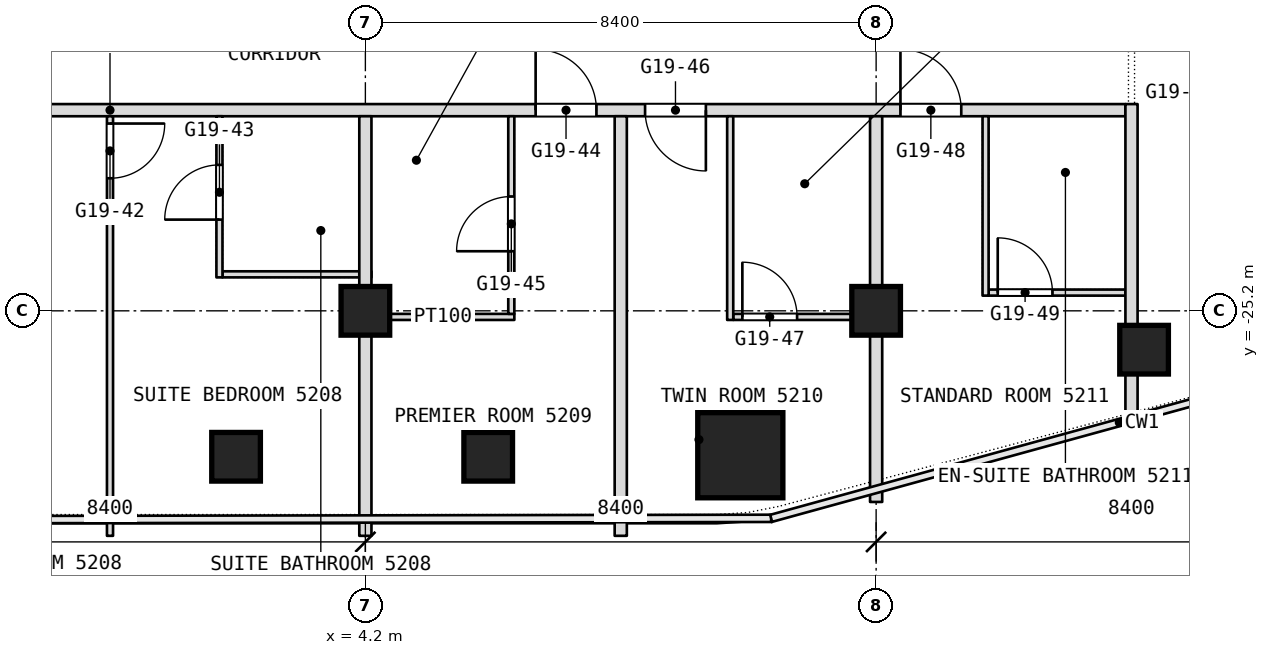
"""IFC4 building model, lengths in metres.
Left out: names, types, materials, properties, quantities, classifications, styles, units other than length and angle.
Written with IfcOpenShell. Run it as: python <this file> out.ifc"""

import sys

from ifc_helpers import new_model, si_unit, direction, frame, frame_2d, origin, origin_2d, place, context, subcontext, project, spatial, rectangle, extrude, element, fill, save


model = new_model("IFC4")
c1 = context("Model", 3, precision=1e-05, world=origin(), true_north=direction((0.0, 1.0)))
c2 = subcontext(c1, "Body", "Model", "MODEL_VIEW")
j1 = project(units=[si_unit("LENGTHUNIT", "METRE"), si_unit("PLANEANGLEUNIT", "RADIAN")], contexts=[c1])
p1 = place(None, origin())
s1 = spatial("IfcSite", under=j1, at=p1, CompositionType="ELEMENT")
p2 = place(p1, origin())
s2 = spatial("IfcBuilding", under=s1, at=p2, CompositionType="ELEMENT")
p3 = place(p2, frame((0.0, 0.0, 223.7)))
s3 = spatial("IfcBuildingStorey", under=s2, at=p3, CompositionType="ELEMENT", Elevation=223.7)
p4 = place(p3, frame((10.366, -27.575, 0.0), z_axis=(0.0, 0.0, 1.0), x_axis=(1.0, 0.0, 0.0)))
e1 = element("IfcColumn", 1, at=p4, inside=s3, PredefinedType="COLUMN", context=c2, shape_type="SweptSolid", body=[
    extrude(rectangle(XDim=1.4, YDim=1.4, at=origin_2d()), origin(), (0.0, 0.0, 1.0), 3.6),
])
for number, where, z_axis, x_axis in (
    (2, (4.2, -25.2, 0.0), (0.0, 0.0, 1.0), (1.0, 0.0, 0.0)),
    (3, (12.6, -25.2, 0.0), (0.0, 0.0, 1.0), (1.0, 0.0, 0.0)),
    (4, (17.007, -25.839, 0.0), (0.0, 0.0, 1.0), (1.0, 0.0, 0.0)),
    (5, (6.22, -27.6, 0.0), (0.0, 0.0, 1.0), (1.0, 0.0, 0.0)),
    (6, (2.073, -27.6, 0.0), (0.0, 0.0, 1.0), (1.0, 0.0, 0.0)),
):
    element("IfcColumn", number, at=place(p3, frame(where, z_axis=z_axis, x_axis=x_axis)), inside=s3, PredefinedType="COLUMN", context=c2, shape_type="SweptSolid", body=[
        extrude(rectangle(XDim=0.8, YDim=0.8, at=origin_2d()), origin(), (0.0, 0.0, 1.0), 3.6),
    ])
p5 = place(p3, frame((4.3, -25.3, 0.0), z_axis=(0.0, 0.0, 1.0), x_axis=(1.0, 0.0, 0.0)))
e7 = element("IfcWall", 7, at=p5, inside=s3, PredefinedType="PARTITIONING", context=c2, shape_type="SweptSolid", body=[
    extrude(rectangle(XDim=2.35, YDim=0.1, at=frame_2d((1.175, 0.0))), origin(), (0.0, 0.0, 1.0), 2.94),
])
p6 = place(p3, frame((10.25, -25.3, 0.0), z_axis=(0.0, 0.0, 1.0), x_axis=(1.0, 0.0, 0.0)))
e8 = element("IfcWall", 8, at=p6, inside=s3, PredefinedType="PARTITIONING", context=c2, shape_type="SweptSolid", body=[
    extrude(rectangle(XDim=2.45, YDim=0.1, at=frame_2d((1.225, 0.0))), origin(), (0.0, 0.0, 1.0), 2.94),
])
p7 = place(p6, frame((0.15, 0.0, 0.0)))
e9 = element("IfcOpeningElement", 9, at=p7, cuts=e8, PredefinedType="OPENING", context=c2, shape_type="SweptSolid", body=[
    extrude(rectangle(XDim=0.9, YDim=2.1, at=frame_2d((0.45, 1.05))), frame((0.0, 0.05, 0.0), z_axis=(0.0, -1.0, 0.0), x_axis=(1.0, 0.0, 0.0)), (0.0, 0.0, 1.0), 0.1),
])
p8 = place(p3, frame((14.45, -24.9, 0.0), z_axis=(0.0, 0.0, 1.0), x_axis=(1.0, 0.0, 0.0)))
e10 = element("IfcWall", 10, at=p8, inside=s3, PredefinedType="PARTITIONING", context=c2, shape_type="SweptSolid", body=[
    extrude(rectangle(XDim=2.25, YDim=0.1, at=frame_2d((1.125, 0.0))), origin(), (0.0, 0.0, 1.0), 3.34),
])
p9 = place(p8, frame((0.15, 0.0, 0.0)))
e11 = element("IfcOpeningElement", 11, at=p9, cuts=e10, PredefinedType="OPENING", context=c2, shape_type="SweptSolid", body=[
    extrude(rectangle(XDim=0.9, YDim=2.1, at=frame_2d((0.45, 1.05))), frame((0.0, 0.05, 0.0), z_axis=(0.0, -1.0, 0.0), x_axis=(1.0, 0.0, 0.0)), (0.0, 0.0, 1.0), 0.1),
])
p10 = place(p3, frame((1.85, -24.6, 0.0), z_axis=(0.0, 0.0, 1.0), x_axis=(1.0, 0.0, 0.0)))
e12 = element("IfcWall", 12, at=p10, inside=s3, PredefinedType="PARTITIONING", context=c2, shape_type="SweptSolid", body=[
    extrude(rectangle(XDim=2.45, YDim=0.1, at=frame_2d((1.225, 0.0))), origin(), (0.0, 0.0, 1.0), 3.34),
])
p11 = place(p3, frame((-16.7, -21.9, 0.0), z_axis=(0.0, 0.0, 1.0), x_axis=(1.0, 0.0, 0.0)))
e13 = element("IfcWall", 13, at=p11, inside=s3, PredefinedType="PARTITIONING", context=c2, shape_type="SweptSolid", body=[
    extrude(rectangle(XDim=33.4, YDim=0.2, at=frame_2d((16.7, 0.0))), origin(), (0.0, 0.0, 1.0), 3.34),
])
p12 = place(p11, frame((0.3, 0.0, 0.0)))
e14 = element("IfcOpeningElement", 14, at=p12, cuts=e13, PredefinedType="OPENING", context=c2, shape_type="SweptSolid", body=[
    extrude(rectangle(XDim=1.0, YDim=2.1, at=frame_2d((0.5, 1.05))), frame((0.0, 0.1, 0.0), z_axis=(0.0, -1.0, 0.0), x_axis=(1.0, 0.0, 0.0)), (0.0, 0.0, 1.0), 0.2),
])
p13 = place(p11, frame((7.8, 0.0, 0.0)))
e15 = element("IfcOpeningElement", 15, at=p13, cuts=e13, PredefinedType="OPENING", context=c2, shape_type="SweptSolid", body=[
    extrude(rectangle(XDim=1.1, YDim=2.1, at=frame_2d((0.55, 1.05))), frame((0.0, 0.1, 0.0), z_axis=(0.0, -1.0, 0.0), x_axis=(1.0, 0.0, 0.0)), (0.0, 0.0, 1.0), 0.2),
])
p14 = place(p11, frame((14.05, 0.0, 0.0)))
e16 = element("IfcOpeningElement", 16, at=p14, cuts=e13, PredefinedType="OPENING", context=c2, shape_type="SweptSolid", body=[
    extrude(rectangle(XDim=1.1, YDim=2.1, at=frame_2d((0.55, 1.05))), frame((0.0, 0.1, 0.0), z_axis=(0.0, -1.0, 0.0), x_axis=(1.0, 0.0, 0.0)), (0.0, 0.0, 1.0), 0.2),
])
p15 = place(p11, frame((23.7, 0.0, 0.0)))
e17 = element("IfcOpeningElement", 17, at=p15, cuts=e13, PredefinedType="OPENING", context=c2, shape_type="SweptSolid", body=[
    extrude(rectangle(XDim=1.0, YDim=2.1, at=frame_2d((0.5, 1.05))), frame((0.0, 0.1, 0.0), z_axis=(0.0, -1.0, 0.0), x_axis=(1.0, 0.0, 0.0)), (0.0, 0.0, 1.0), 0.2),
])
p16 = place(p11, frame((25.5, 0.0, 0.0)))
e18 = element("IfcOpeningElement", 18, at=p16, cuts=e13, PredefinedType="OPENING", context=c2, shape_type="SweptSolid", body=[
    extrude(rectangle(XDim=1.0, YDim=2.1, at=frame_2d((0.5, 1.05))), frame((0.0, 0.1, 0.0), z_axis=(0.0, -1.0, 0.0), x_axis=(1.0, 0.0, 0.0)), (0.0, 0.0, 1.0), 0.2),
])
p17 = place(p11, frame((29.7, 0.0, 0.0)))
e19 = element("IfcOpeningElement", 19, at=p17, cuts=e13, PredefinedType="OPENING", context=c2, shape_type="SweptSolid", body=[
    extrude(rectangle(XDim=1.0, YDim=2.1, at=frame_2d((0.5, 1.05))), frame((0.0, 0.1, 0.0), z_axis=(0.0, -1.0, 0.0), x_axis=(1.0, 0.0, 0.0)), (0.0, 0.0, 1.0), 0.2),
])
p18 = place(p3, frame((16.8, -27.229, 0.0), z_axis=(0.0, 0.0, 1.0), x_axis=(0.0, 1.0, 0.0)))
e20 = element("IfcWall", 20, at=p18, inside=s3, PredefinedType="PARTITIONING", context=c2, shape_type="SweptSolid", body=[
    extrude(rectangle(XDim=5.429, YDim=0.2, at=frame_2d((2.714, 0.0))), origin(), (0.0, 0.0, 1.0), 3.34),
])
p19 = place(p3, frame((14.4, -24.95, 0.0), z_axis=(0.0, 0.0, 1.0), x_axis=(0.0, 1.0, 0.0)))
e21 = element("IfcWall", 21, at=p19, inside=s3, PredefinedType="PARTITIONING", context=c2, shape_type="SweptSolid", body=[
    extrude(rectangle(XDim=2.95, YDim=0.1, at=frame_2d((1.475, 0.0))), origin(), (0.0, 0.0, 1.0), 3.34),
])
p20 = place(p3, frame((12.6, -28.343, 0.0), z_axis=(0.0, 0.0, 1.0), x_axis=(0.0, 1.0, 0.0)))
e22 = element("IfcWall", 22, at=p20, inside=s3, PredefinedType="PARTITIONING", context=c2, shape_type="SweptSolid", body=[
    extrude(rectangle(XDim=6.343, YDim=0.2, at=frame_2d((3.171, 0.0))), origin(), (0.0, 0.0, 1.0), 3.34),
])
p21 = place(p3, frame((10.2, -25.35, 0.0), z_axis=(0.0, 0.0, 1.0), x_axis=(0.0, 1.0, 0.0)))
e23 = element("IfcWall", 23, at=p21, inside=s3, PredefinedType="PARTITIONING", context=c2, shape_type="SweptSolid", body=[
    extrude(rectangle(XDim=3.35, YDim=0.1, at=frame_2d((1.675, 0.0))), origin(), (0.0, 0.0, 1.0), 3.34),
])
p22 = place(p3, frame((8.4, -28.9, 0.0), z_axis=(0.0, 0.0, 1.0), x_axis=(0.0, 1.0, 0.0)))
e24 = element("IfcWall", 24, at=p22, inside=s3, PredefinedType="PARTITIONING", context=c2, shape_type="SweptSolid", body=[
    extrude(rectangle(XDim=6.9, YDim=0.2, at=frame_2d((3.45, 0.0))), origin(), (0.0, 0.0, 1.0), 3.34),
])
p23 = place(p3, frame((6.6, -25.25, 0.0), z_axis=(0.0, 0.0, 1.0), x_axis=(0.0, 1.0, 0.0)))
e25 = element("IfcWall", 25, at=p23, inside=s3, PredefinedType="PARTITIONING", context=c2, shape_type="SweptSolid", body=[
    extrude(rectangle(XDim=3.25, YDim=0.1, at=frame_2d((1.625, 0.0))), origin(), (0.0, 0.0, 1.0), 3.34),
])
p24 = place(p23, frame((1.03, 0.0, 0.0)))
e26 = element("IfcOpeningElement", 26, at=p24, cuts=e25, PredefinedType="OPENING", context=c2, shape_type="SweptSolid", body=[
    extrude(rectangle(XDim=0.9, YDim=2.1, at=frame_2d((0.45, 1.05))), frame((0.0, 0.05, 0.0), z_axis=(0.0, -1.0, 0.0), x_axis=(1.0, 0.0, 0.0)), (0.0, 0.0, 1.0), 0.1),
])
p25 = place(p3, frame((4.2, -28.9, 0.0), z_axis=(0.0, 0.0, 1.0), x_axis=(0.0, 1.0, 0.0)))
e27 = element("IfcWall", 27, at=p25, inside=s3, PredefinedType="PARTITIONING", context=c2, shape_type="SweptSolid", body=[
    extrude(rectangle(XDim=6.9, YDim=0.2, at=frame_2d((3.45, 0.0))), origin(), (0.0, 0.0, 1.0), 3.34),
])
p26 = place(p3, frame((1.8, -24.65, 0.0), z_axis=(0.0, 0.0, 1.0), x_axis=(0.0, 1.0, 0.0)))
e28 = element("IfcWall", 28, at=p26, inside=s3, PredefinedType="PARTITIONING", context=c2, shape_type="SweptSolid", body=[
    extrude(rectangle(XDim=2.65, YDim=0.1, at=frame_2d((1.325, 0.0))), origin(), (0.0, 0.0, 1.0), 3.34),
])
p27 = place(p26, frame((0.95, 0.0, 0.0)))
e29 = element("IfcOpeningElement", 29, at=p27, cuts=e28, PredefinedType="OPENING", context=c2, shape_type="SweptSolid", body=[
    extrude(rectangle(XDim=0.9, YDim=2.1, at=frame_2d((0.45, 1.05))), frame((0.0, 0.05, 0.0), z_axis=(0.0, -1.0, 0.0), x_axis=(1.0, 0.0, 0.0)), (0.0, 0.0, 1.0), 0.1),
])
p28 = place(p3, frame((0.0, -28.9, 0.0), z_axis=(0.0, 0.0, 1.0), x_axis=(0.0, 1.0, 0.0)))
e30 = element("IfcWall", 30, at=p28, inside=s3, PredefinedType="PARTITIONING", context=c2, shape_type="SweptSolid", body=[
    extrude(rectangle(XDim=6.9, YDim=0.1, at=frame_2d((3.45, 0.0))), origin(), (0.0, 0.0, 1.0), 3.34),
])
p29 = place(p28, frame((5.88, 0.0, 0.0)))
e31 = element("IfcOpeningElement", 31, at=p29, cuts=e30, PredefinedType="OPENING", context=c2, shape_type="SweptSolid", body=[
    extrude(rectangle(XDim=0.9, YDim=2.1, at=frame_2d((0.45, 1.05))), frame((0.0, 0.05, 0.0), z_axis=(0.0, -1.0, 0.0), x_axis=(1.0, 0.0, 0.0)), (0.0, 0.0, 1.0), 0.1),
])
p30 = place(p7, origin())
e32 = element("IfcDoor", 32, at=p30, inside=s3, OperationType="SINGLE_SWING_LEFT", PredefinedType="DOOR", context=c2, shape_type="SweptSolid", body=[
    extrude(rectangle(XDim=0.9, YDim=2.1, at=frame_2d((0.45, 1.05))), frame((0.0, 0.025, 0.0), z_axis=(0.0, -1.0, 0.0), x_axis=(1.0, 0.0, 0.0)), (0.0, 0.0, 1.0), 0.05),
])
fill(e9, e32)
p31 = place(p9, origin())
e33 = element("IfcDoor", 33, at=p31, inside=s3, OperationType="SINGLE_SWING_LEFT", PredefinedType="DOOR", context=c2, shape_type="SweptSolid", body=[
    extrude(rectangle(XDim=0.9, YDim=2.1, at=frame_2d((0.45, 1.05))), frame((0.0, 0.025, 0.0), z_axis=(0.0, -1.0, 0.0), x_axis=(1.0, 0.0, 0.0)), (0.0, 0.0, 1.0), 0.05),
])
fill(e11, e33)
p32 = place(p15, origin())
e34 = element("IfcDoor", 34, at=p32, inside=s3, OperationType="SINGLE_SWING_RIGHT", PredefinedType="DOOR", context=c2, shape_type="SweptSolid", body=[
    extrude(rectangle(XDim=1.0, YDim=2.1, at=frame_2d((0.5, 1.05))), frame((0.0, 0.025, 0.0), z_axis=(0.0, -1.0, 0.0), x_axis=(1.0, 0.0, 0.0)), (0.0, 0.0, 1.0), 0.05),
])
fill(e17, e34)
p33 = place(p16, origin())
e35 = element("IfcDoor", 35, at=p33, inside=s3, OperationType="SINGLE_SWING_RIGHT", PredefinedType="DOOR", context=c2, shape_type="SweptSolid", body=[
    extrude(rectangle(XDim=1.0, YDim=2.1, at=frame_2d((0.5, 1.05))), frame((0.0, 0.025, 0.0), z_axis=(0.0, -1.0, 0.0), x_axis=(1.0, 0.0, 0.0)), (0.0, 0.0, 1.0), 0.05),
])
fill(e18, e35)
p34 = place(p17, origin())
e36 = element("IfcDoor", 36, at=p34, inside=s3, OperationType="SINGLE_SWING_RIGHT", PredefinedType="DOOR", context=c2, shape_type="SweptSolid", body=[
    extrude(rectangle(XDim=1.0, YDim=2.1, at=frame_2d((0.5, 1.05))), frame((0.0, 0.025, 0.0), z_axis=(0.0, -1.0, 0.0), x_axis=(1.0, 0.0, 0.0)), (0.0, 0.0, 1.0), 0.05),
])
fill(e19, e36)
p35 = place(p24, origin())
e37 = element("IfcDoor", 37, at=p35, inside=s3, OperationType="SINGLE_SWING_LEFT", PredefinedType="DOOR", context=c2, shape_type="SweptSolid", body=[
    extrude(rectangle(XDim=0.9, YDim=2.1, at=frame_2d((0.45, 1.05))), frame((0.0, 0.025, 0.0), z_axis=(0.0, -1.0, 0.0), x_axis=(1.0, 0.0, 0.0)), (0.0, 0.0, 1.0), 0.05),
])
fill(e26, e37)
p36 = place(p27, origin())
e38 = element("IfcDoor", 38, at=p36, inside=s3, OperationType="SINGLE_SWING_LEFT", PredefinedType="DOOR", context=c2, shape_type="SweptSolid", body=[
    extrude(rectangle(XDim=0.9, YDim=2.1, at=frame_2d((0.45, 1.05))), frame((0.0, 0.025, 0.0), z_axis=(0.0, -1.0, 0.0), x_axis=(1.0, 0.0, 0.0)), (0.0, 0.0, 1.0), 0.05),
])
fill(e29, e38)
p37 = place(p29, origin())
e39 = element("IfcDoor", 39, at=p37, inside=s3, OperationType="SINGLE_SWING_LEFT", PredefinedType="DOOR", context=c2, shape_type="SweptSolid", body=[
    extrude(rectangle(XDim=0.9, YDim=2.1, at=frame_2d((0.45, 1.05))), frame((0.0, 0.025, 0.0), z_axis=(0.0, -1.0, 0.0), x_axis=(1.0, 0.0, 0.0)), (0.0, 0.0, 1.0), 0.05),
])
fill(e31, e39)
save(model, sys.argv[1])
